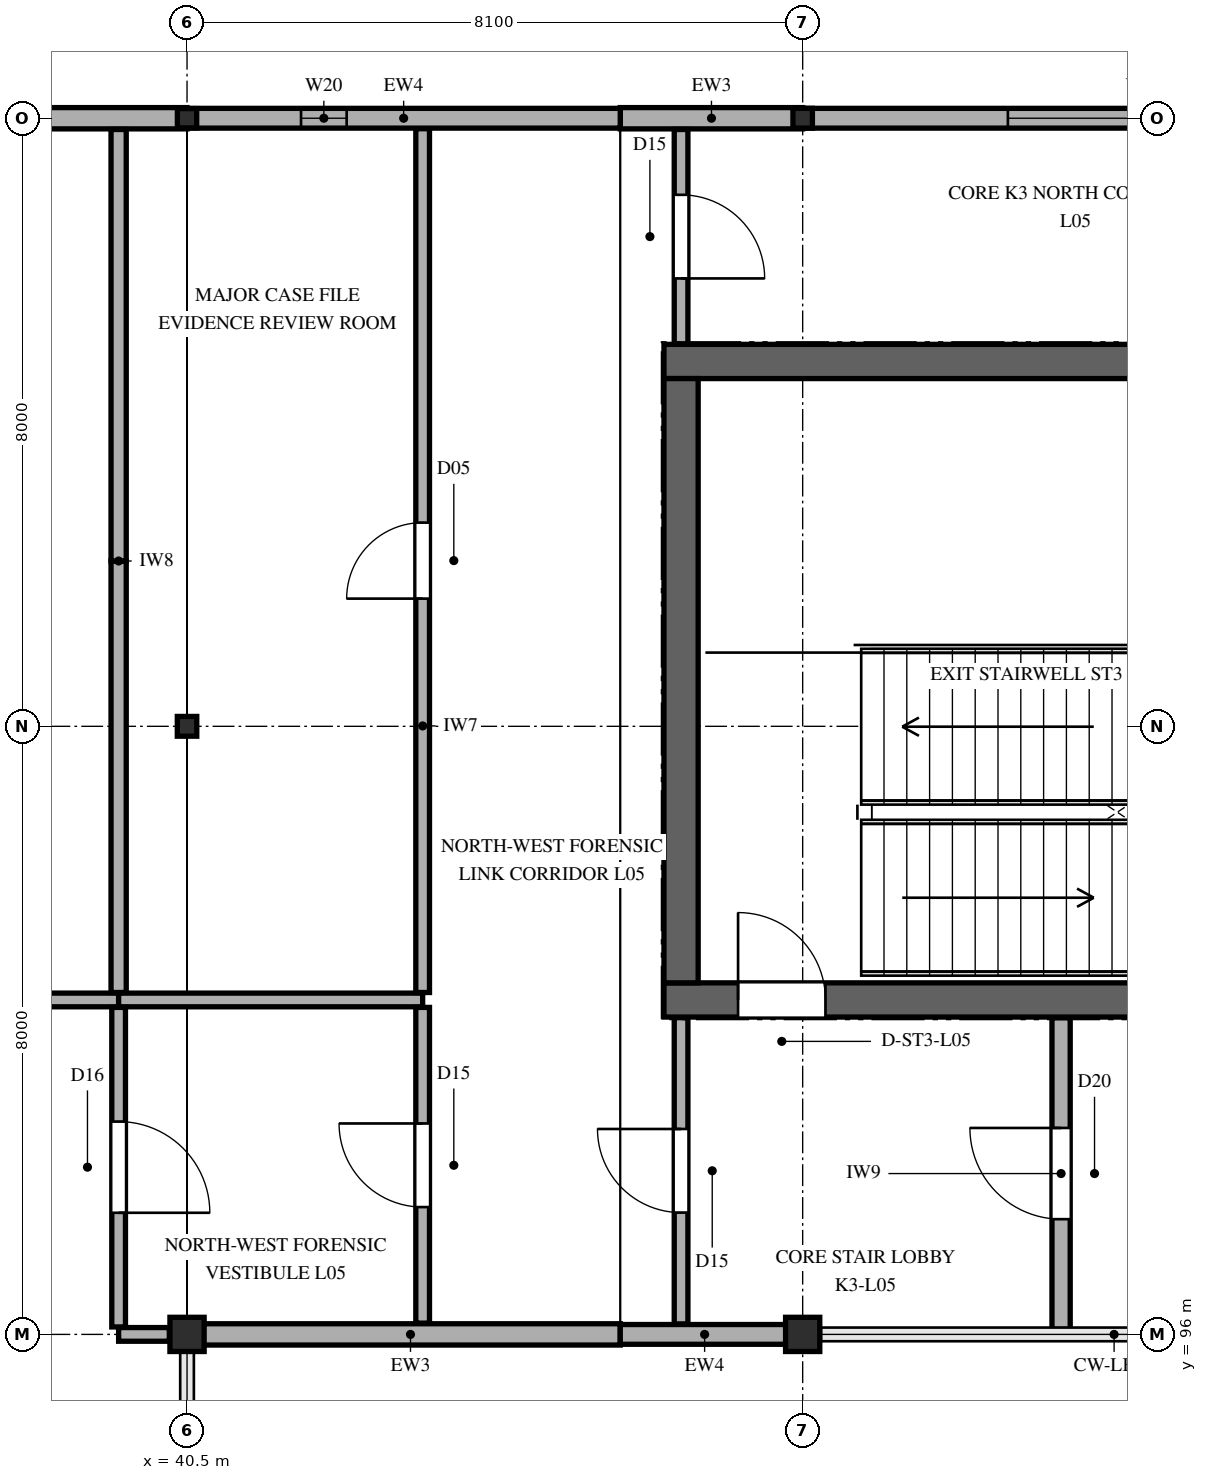
"""IFC4 building model, lengths in metres.
Left out: names, types, materials, properties, quantities, classifications, styles, units other than length and angle.
Written with IfcOpenShell. Run it as: python <this file> out.ifc"""

import sys

from ifc_helpers import new_model, si_unit, direction, frame, frame_2d, origin, origin_2d, place, context, subcontext, project, spatial, rectangle, hollow_rectangle, i_section, extrude, element, fill, save


model = new_model("IFC4")
c1 = context("Model", 3, precision=1e-05, world=origin(), true_north=direction((0.0, 1.0)))
c2 = subcontext(c1, "Body", "Model", "MODEL_VIEW")
j1 = project(units=[si_unit("LENGTHUNIT", "METRE"), si_unit("PLANEANGLEUNIT", "RADIAN")], contexts=[c1])
p1 = place(None, origin())
s1 = spatial("IfcSite", under=j1, at=p1, CompositionType="ELEMENT")
p2 = place(p1, origin())
s2 = spatial("IfcBuilding", under=s1, at=p2, CompositionType="ELEMENT")
p3 = place(p2, frame((0.0, 0.0, 24.9)))
s3 = spatial("IfcBuildingStorey", under=s2, at=p3, CompositionType="ELEMENT", Elevation=24.9)
p4 = place(p3, frame((46.775, 100.4, 0.0), z_axis=(0.0, 0.0, 1.0), x_axis=(1.0, 0.0, 0.0)))
e1 = element("IfcWall", 1, at=p4, inside=s3, PredefinedType="SHEAR", context=c2, shape_type="SweptSolid", body=[
    extrude(rectangle(XDim=15.25, YDim=0.45, at=frame_2d((7.625, 0.0))), origin(), (0.0, 0.0, 1.0), 4.2),
])
p5 = place(p4, frame((0.975, 0.0, 0.0)))
e2 = element("IfcOpeningElement", 2, at=p5, cuts=e1, PredefinedType="OPENING", context=c2, shape_type="SweptSolid", body=[
    extrude(rectangle(XDim=1.15, YDim=2.25, at=frame_2d((0.575, 1.125))), frame((0.0, 0.235, 0.0), z_axis=(0.0, -1.0, 0.0), x_axis=(1.0, 0.0, 0.0)), (0.0, 0.0, 1.0), 0.47),
])
p6 = place(p4, frame((10.258, 0.0, 0.0)))
e3 = element("IfcOpeningElement", 3, at=p6, cuts=e1, PredefinedType="OPENING", context=c2, shape_type="SweptSolid", body=[
    extrude(rectangle(XDim=1.1, YDim=2.2, at=frame_2d((0.55, 1.1))), frame((0.0, 0.235, 0.0), z_axis=(0.0, -1.0, 0.0), x_axis=(1.0, 0.0, 0.0)), (0.0, 0.0, 1.0), 0.47),
])
p7 = place(p4, frame((12.972, 0.0, 0.0)))
e4 = element("IfcOpeningElement", 4, at=p7, cuts=e1, PredefinedType="OPENING", context=c2, shape_type="SweptSolid", body=[
    extrude(rectangle(XDim=1.1, YDim=2.2, at=frame_2d((0.55, 1.1))), frame((0.0, 0.235, 0.0), z_axis=(0.0, -1.0, 0.0), x_axis=(1.0, 0.0, 0.0)), (0.0, 0.0, 1.0), 0.47),
])
p8 = place(p3, frame((46.775, 108.8, 0.0), z_axis=(0.0, 0.0, 1.0), x_axis=(1.0, 0.0, 0.0)))
e5 = element("IfcWall", 5, at=p8, inside=s3, PredefinedType="SHEAR", context=c2, shape_type="SweptSolid", body=[
    extrude(rectangle(XDim=15.25, YDim=0.45, at=frame_2d((7.625, 0.0))), origin(), (0.0, 0.0, 1.0), 4.2),
])
p9 = place(p3, frame((47.0, 100.625, 0.0), z_axis=(0.0, 0.0, 1.0), x_axis=(0.0, 1.0, 0.0)))
e6 = element("IfcWall", 6, at=p9, inside=s3, PredefinedType="SHEAR", context=c2, shape_type="SweptSolid", body=[
    extrude(rectangle(XDim=7.95, YDim=0.45, at=frame_2d((3.975, 0.0))), origin(), (0.0, 0.0, 1.0), 4.2),
])
p10 = place(p3, frame((40.5, 96.0, 0.0), z_axis=(0.0, 0.0, 1.0), x_axis=(1.0, 0.0, 0.0)))
e7 = element("IfcColumn", 7, at=p10, inside=s3, PredefinedType="COLUMN", context=c2, shape_type="SweptSolid", body=[
    extrude(rectangle(XDim=0.45, YDim=0.45, at=origin_2d()), origin(), (0.0, 0.0, 1.0), 4.2),
])
p11 = place(p3, frame((40.5, 104.0, 0.0), z_axis=(0.0, 0.0, 1.0), x_axis=(1.0, 0.0, 0.0)))
e8 = element("IfcColumn", 8, at=p11, inside=s3, PredefinedType="COLUMN", context=c2, shape_type="SweptSolid", body=[
    extrude(i_section(OverallWidth=0.256, OverallDepth=0.26, WebThickness=0.011, FlangeThickness=0.017, FilletRadius=0.013, at=origin_2d()), origin(), (0.0, 0.0, 1.0), 4.2),
])
p12 = place(p3, frame((40.5, 112.0, 0.0), z_axis=(0.0, 0.0, 1.0), x_axis=(1.0, 0.0, 0.0)))
e9 = element("IfcColumn", 9, at=p12, inside=s3, PredefinedType="COLUMN", context=c2, shape_type="SweptSolid", body=[
    extrude(hollow_rectangle(XDim=0.254, YDim=0.254, WallThickness=0.013, InnerFilletRadius=0.013, OuterFilletRadius=0.025, at=origin_2d()), origin(), (0.0, 0.0, 1.0), 4.2),
])
p13 = place(p3, frame((48.6, 96.0, 0.0), z_axis=(0.0, 0.0, 1.0), x_axis=(1.0, 0.0, 0.0)))
e10 = element("IfcColumn", 10, at=p13, inside=s3, PredefinedType="COLUMN", context=c2, shape_type="SweptSolid", body=[
    extrude(rectangle(XDim=0.45, YDim=0.45, at=origin_2d()), origin(), (0.0, 0.0, 1.0), 4.2),
])
p14 = place(p3, frame((48.6, 112.0, 0.0), z_axis=(0.0, 0.0, 1.0), x_axis=(1.0, 0.0, 0.0)))
e11 = element("IfcColumn", 11, at=p14, inside=s3, PredefinedType="COLUMN", context=c2, shape_type="SweptSolid", body=[
    extrude(i_section(OverallWidth=0.256, OverallDepth=0.26, WebThickness=0.011, FlangeThickness=0.017, FilletRadius=0.013, at=origin_2d()), origin(), (0.0, 0.0, 1.0), 4.2),
])
p15 = place(p3, frame((40.68, 96.0, 0.0), z_axis=(0.0, 0.0, 1.0), x_axis=(1.0, 0.0, 0.0)))
e12 = element("IfcWall", 12, at=p15, inside=s3, PredefinedType="SOLIDWALL", context=c2, shape_type="SweptSolid", body=[
    extrude(rectangle(XDim=5.52, YDim=0.28, at=frame_2d((2.76, 0.0))), origin(), (0.0, 0.0, 1.0), 3.402),
])
p16 = place(p3, frame((46.2, 96.0, 0.0), z_axis=(0.0, 0.0, 1.0), x_axis=(1.0, 0.0, 0.0)))
e13 = element("IfcWall", 13, at=p16, inside=s3, PredefinedType="SOLIDWALL", context=c2, shape_type="SweptSolid", body=[
    extrude(rectangle(XDim=2.22, YDim=0.26, at=frame_2d((1.11, 0.0))), origin(), (0.0, 0.0, 1.0), 3.402),
])
p17 = place(p3, frame((62.1, 112.0, 0.0), z_axis=(0.0, 0.0, 1.0), x_axis=(-1.0, 0.0, 0.0)))
e14 = element("IfcWall", 14, at=p17, inside=s3, PredefinedType="SOLIDWALL", context=c2, shape_type="SweptSolid", body=[
    extrude(rectangle(XDim=13.5, YDim=0.26, at=frame_2d((6.75, 0.0))), origin(), (0.0, 0.0, 1.0), 3.402),
])
p18 = place(p17, frame((7.2, 0.0, 0.95)))
e15 = element("IfcOpeningElement", 15, at=p18, cuts=e14, PredefinedType="OPENING", context=c2, shape_type="SweptSolid", body=[
    extrude(rectangle(XDim=3.6, YDim=1.8, at=frame_2d((1.8, 0.9))), frame((0.0, 0.14, 0.0), z_axis=(0.0, -1.0, 0.0), x_axis=(1.0, 0.0, 0.0)), (0.0, 0.0, 1.0), 0.28),
])
p19 = place(p3, frame((48.6, 112.0, 0.0), z_axis=(0.0, 0.0, 1.0), x_axis=(-1.0, 0.0, 0.0)))
e16 = element("IfcWall", 16, at=p19, inside=s3, PredefinedType="SOLIDWALL", context=c2, shape_type="SweptSolid", body=[
    extrude(rectangle(XDim=2.4, YDim=0.28, at=frame_2d((1.2, 0.0))), origin(), (0.0, 0.0, 1.0), 3.489),
])
p20 = place(p3, frame((46.2, 112.0, 0.0), z_axis=(0.0, 0.0, 1.0), x_axis=(-1.0, 0.0, 0.0)))
e17 = element("IfcWall", 17, at=p20, inside=s3, PredefinedType="SOLIDWALL", context=c2, shape_type="SweptSolid", body=[
    extrude(rectangle(XDim=5.7, YDim=0.26, at=frame_2d((2.85, 0.0))), origin(), (0.0, 0.0, 1.0), 3.489),
])
p21 = place(p20, frame((3.6, 0.0, 0.95)))
e18 = element("IfcOpeningElement", 18, at=p21, cuts=e17, PredefinedType="OPENING", context=c2, shape_type="SweptSolid", body=[
    extrude(rectangle(XDim=0.6, YDim=1.8, at=frame_2d((0.3, 0.9))), frame((0.0, 0.14, 0.0), z_axis=(0.0, -1.0, 0.0), x_axis=(1.0, 0.0, 0.0)), (0.0, 0.0, 1.0), 0.28),
])
p22 = place(p3, frame((40.5, 112.0, 0.0), z_axis=(0.0, 0.0, 1.0), x_axis=(-1.0, 0.0, 0.0)))
e19 = element("IfcWall", 19, at=p22, inside=s3, PredefinedType="SOLIDWALL", context=c2, shape_type="SweptSolid", body=[
    extrude(rectangle(XDim=12.15, YDim=0.28, at=frame_2d((6.075, 0.0))), origin(), (0.0, 0.0, 1.0), 3.402),
])
p23 = place(p22, frame((5.85, 0.0, 0.85)))
e20 = element("IfcOpeningElement", 20, at=p23, cuts=e19, PredefinedType="OPENING", context=c2, shape_type="SweptSolid", body=[
    extrude(rectangle(XDim=0.75, YDim=2.2, at=frame_2d((0.375, 1.1))), frame((0.0, 0.15, 0.0), z_axis=(0.0, -1.0, 0.0), x_axis=(1.0, 0.0, 0.0)), (0.0, 0.0, 1.0), 0.3),
])
p24 = place(p3, frame((36.2, 100.4, 0.0), z_axis=(0.0, 0.0, 1.0), x_axis=(1.0, 0.0, 0.0)))
e21 = element("IfcWall", 21, at=p24, inside=s3, PredefinedType="PARTITIONING", context=c2, shape_type="SweptSolid", body=[
    extrude(rectangle(XDim=3.4, YDim=0.18, at=frame_2d((1.7, 0.0))), origin(), (0.0, 0.0, 1.0), 3.96),
])
p25 = place(p3, frame((39.6, 96.0, 0.0), z_axis=(0.0, 0.0, 1.0), x_axis=(1.0, 0.0, 0.0)))
e22 = element("IfcWall", 22, at=p25, inside=s3, PredefinedType="PARTITIONING", context=c2, shape_type="SweptSolid", body=[
    extrude(rectangle(XDim=0.667, YDim=0.18, at=frame_2d((0.333, 0.0))), origin(), (0.0, 0.0, 1.0), 3.489),
])
p26 = place(p3, frame((39.6, 100.4, 0.0), z_axis=(0.0, 0.0, 1.0), x_axis=(1.0, 0.0, 0.0)))
e23 = element("IfcWall", 23, at=p26, inside=s3, PredefinedType="PARTITIONING", context=c2, shape_type="SweptSolid", body=[
    extrude(rectangle(XDim=4.0, YDim=0.18, at=frame_2d((2.0, 0.0))), origin(), (0.0, 0.0, 1.0), 3.96),
])
p27 = place(p3, frame((39.6, 96.098, 0.0), z_axis=(0.0, 0.0, 1.0), x_axis=(0.0, 1.0, 0.0)))
e24 = element("IfcWall", 24, at=p27, inside=s3, PredefinedType="PARTITIONING", context=c2, shape_type="SweptSolid", body=[
    extrude(rectangle(XDim=4.204, YDim=0.18, at=frame_2d((2.102, 0.0))), origin(), (0.0, 0.0, 1.0), 3.96),
])
p28 = place(p27, frame((1.502, 0.0, 0.0)))
e25 = element("IfcOpeningElement", 25, at=p28, cuts=e24, PredefinedType="OPENING", context=c2, shape_type="SweptSolid", body=[
    extrude(rectangle(XDim=1.2, YDim=2.2, at=frame_2d((0.6, 1.1))), frame((0.0, 0.1, 0.0), z_axis=(0.0, -1.0, 0.0), x_axis=(1.0, 0.0, 0.0)), (0.0, 0.0, 1.0), 0.2),
])
for number, where, z_axis, x_axis in (
    (26, (39.6, 100.498, 0.0), (0.0, 0.0, 1.0), (0.0, 1.0, 0.0)),
    (27, (39.6, 106.175, 0.0), (0.0, 0.0, 1.0), (0.0, 1.0, 0.0)),
):
    element("IfcWall", number, at=place(p3, frame(where, z_axis=z_axis, x_axis=x_axis)), inside=s3, PredefinedType="PARTITIONING", context=c2, shape_type="SweptSolid", body=[
        extrude(rectangle(XDim=5.677, YDim=0.2, at=frame_2d((2.838, 0.0))), origin(), (0.0, 0.0, 1.0), 3.96),
    ])
p29 = place(p3, frame((43.6, 96.148, 0.0), z_axis=(0.0, 0.0, 1.0), x_axis=(0.0, 1.0, 0.0)))
e28 = element("IfcWall", 28, at=p29, inside=s3, PredefinedType="PARTITIONING", context=c2, shape_type="SweptSolid", body=[
    extrude(rectangle(XDim=4.154, YDim=0.18, at=frame_2d((2.077, 0.0))), origin(), (0.0, 0.0, 1.0), 3.96),
])
p30 = place(p29, frame((1.527, 0.0, 0.0)))
e29 = element("IfcOpeningElement", 29, at=p30, cuts=e28, PredefinedType="OPENING", context=c2, shape_type="SweptSolid", body=[
    extrude(rectangle(XDim=1.1, YDim=2.2, at=frame_2d((0.55, 1.1))), frame((0.0, 0.1, 0.0), z_axis=(0.0, -1.0, 0.0), x_axis=(1.0, 0.0, 0.0)), (0.0, 0.0, 1.0), 0.2),
])
p31 = place(p3, frame((43.6, 100.498, 0.0), z_axis=(0.0, 0.0, 1.0), x_axis=(0.0, 1.0, 0.0)))
e30 = element("IfcWall", 30, at=p31, inside=s3, PredefinedType="PARTITIONING", context=c2, shape_type="SweptSolid", body=[
    extrude(rectangle(XDim=11.364, YDim=0.18, at=frame_2d((5.682, 0.0))), origin(), (0.0, 0.0, 1.0), 3.96),
])
p32 = place(p31, frame((5.182, 0.0, 0.0)))
e31 = element("IfcOpeningElement", 31, at=p32, cuts=e30, PredefinedType="OPENING", context=c2, shape_type="SweptSolid", body=[
    extrude(rectangle(XDim=1.0, YDim=2.2, at=frame_2d((0.5, 1.1))), frame((0.0, 0.1, 0.0), z_axis=(0.0, -1.0, 0.0), x_axis=(1.0, 0.0, 0.0)), (0.0, 0.0, 1.0), 0.2),
])
p33 = place(p3, frame((47.0, 96.138, 0.0), z_axis=(0.0, 0.0, 1.0), x_axis=(0.0, 1.0, 0.0)))
e32 = element("IfcWall", 32, at=p33, inside=s3, PredefinedType="PARTITIONING", context=c2, shape_type="SweptSolid", body=[
    extrude(rectangle(XDim=4.029, YDim=0.18, at=frame_2d((2.015, 0.0))), origin(), (0.0, 0.0, 1.0), 3.96),
])
p34 = place(p33, frame((1.465, 0.0, 0.0)))
e33 = element("IfcOpeningElement", 33, at=p34, cuts=e32, PredefinedType="OPENING", context=c2, shape_type="SweptSolid", body=[
    extrude(rectangle(XDim=1.1, YDim=2.2, at=frame_2d((0.55, 1.1))), frame((0.0, 0.1, 0.0), z_axis=(0.0, -1.0, 0.0), x_axis=(1.0, 0.0, 0.0)), (0.0, 0.0, 1.0), 0.2),
])
p35 = place(p3, frame((47.0, 109.033, 0.0), z_axis=(0.0, 0.0, 1.0), x_axis=(0.0, 1.0, 0.0)))
e34 = element("IfcWall", 34, at=p35, inside=s3, PredefinedType="PARTITIONING", context=c2, shape_type="SweptSolid", body=[
    extrude(rectangle(XDim=2.819, YDim=0.18, at=frame_2d((1.41, 0.0))), origin(), (0.0, 0.0, 1.0), 3.96),
])
p36 = place(p35, frame((0.86, 0.0, 0.0)))
e35 = element("IfcOpeningElement", 35, at=p36, cuts=e34, PredefinedType="OPENING", context=c2, shape_type="SweptSolid", body=[
    extrude(rectangle(XDim=1.1, YDim=2.2, at=frame_2d((0.55, 1.1))), frame((0.0, 0.1, 0.0), z_axis=(0.0, -1.0, 0.0), x_axis=(1.0, 0.0, 0.0)), (0.0, 0.0, 1.0), 0.2),
])
p37 = place(p3, frame((52.0, 96.065, 0.0), z_axis=(0.0, 0.0, 1.0), x_axis=(0.0, 1.0, 0.0)))
e36 = element("IfcWall", 36, at=p37, inside=s3, PredefinedType="PARTITIONING", context=c2, shape_type="SweptSolid", body=[
    extrude(rectangle(XDim=4.102, YDim=0.24, at=frame_2d((2.051, 0.0))), origin(), (0.0, 0.0, 1.0), 3.96),
])
p38 = place(p37, frame((1.451, 0.0, 0.0)))
e37 = element("IfcOpeningElement", 37, at=p38, cuts=e36, PredefinedType="OPENING", context=c2, shape_type="SweptSolid", body=[
    extrude(rectangle(XDim=1.2, YDim=2.3, at=frame_2d((0.6, 1.15))), frame((0.0, 0.13, 0.0), z_axis=(0.0, -1.0, 0.0), x_axis=(1.0, 0.0, 0.0)), (0.0, 0.0, 1.0), 0.26),
])
p39 = place(p18, origin())
e38 = element("IfcWindow", 38, at=p39, inside=s3, PartitioningType="TRIPLE_PANEL_VERTICAL", PredefinedType="WINDOW", context=c2, shape_type="SweptSolid", body=[
    extrude(rectangle(XDim=3.6, YDim=1.8, at=frame_2d((1.8, 0.9))), frame((0.0, 0.03, 0.0), z_axis=(0.0, -1.0, 0.0), x_axis=(1.0, 0.0, 0.0)), (0.0, 0.0, 1.0), 0.06),
])
fill(e15, e38)
p40 = place(p21, origin())
e39 = element("IfcWindow", 39, at=p40, inside=s3, PartitioningType="SINGLE_PANEL", PredefinedType="WINDOW", context=c2, shape_type="SweptSolid", body=[
    extrude(rectangle(XDim=0.6, YDim=1.8, at=frame_2d((0.3, 0.9))), frame((0.0, 0.03, 0.0), z_axis=(0.0, -1.0, 0.0), x_axis=(1.0, 0.0, 0.0)), (0.0, 0.0, 1.0), 0.06),
])
fill(e18, e39)
p41 = place(p5, origin())
e40 = element("IfcDoor", 40, at=p41, inside=s3, OperationType="SINGLE_SWING_LEFT", PredefinedType="DOOR", context=c2, shape_type="SweptSolid", body=[
    extrude(rectangle(XDim=1.15, YDim=2.25, at=frame_2d((0.575, 1.125))), frame((0.0, 0.025, 0.0), z_axis=(0.0, -1.0, 0.0), x_axis=(1.0, 0.0, 0.0)), (0.0, 0.0, 1.0), 0.05),
])
fill(e2, e40)
p42 = place(p28, frame((1.2, 0.0, 0.0), z_axis=(0.0, 0.0, 1.0), x_axis=(-1.0, 0.0, 0.0)))
e41 = element("IfcDoor", 41, at=p42, inside=s3, OperationType="SINGLE_SWING_LEFT", PredefinedType="DOOR", context=c2, shape_type="SweptSolid", body=[
    extrude(rectangle(XDim=1.2, YDim=2.2, at=frame_2d((0.6, 1.1))), frame((0.0, 0.025, 0.0), z_axis=(0.0, -1.0, 0.0), x_axis=(1.0, 0.0, 0.0)), (0.0, 0.0, 1.0), 0.05),
])
fill(e25, e41)
p43 = place(p30, origin())
e42 = element("IfcDoor", 42, at=p43, inside=s3, OperationType="SINGLE_SWING_RIGHT", PredefinedType="DOOR", context=c2, shape_type="SweptSolid", body=[
    extrude(rectangle(XDim=1.1, YDim=2.2, at=frame_2d((0.55, 1.1))), frame((0.0, 0.025, 0.0), z_axis=(0.0, -1.0, 0.0), x_axis=(1.0, 0.0, 0.0)), (0.0, 0.0, 1.0), 0.05),
])
fill(e29, e42)
p44 = place(p32, origin())
e43 = element("IfcDoor", 43, at=p44, inside=s3, OperationType="SINGLE_SWING_LEFT", PredefinedType="DOOR", context=c2, shape_type="SweptSolid", body=[
    extrude(rectangle(XDim=1.0, YDim=2.2, at=frame_2d((0.5, 1.1))), frame((0.0, 0.025, 0.0), z_axis=(0.0, -1.0, 0.0), x_axis=(1.0, 0.0, 0.0)), (0.0, 0.0, 1.0), 0.05),
])
fill(e31, e43)
p45 = place(p34, origin())
e44 = element("IfcDoor", 44, at=p45, inside=s3, OperationType="SINGLE_SWING_RIGHT", PredefinedType="DOOR", context=c2, shape_type="SweptSolid", body=[
    extrude(rectangle(XDim=1.1, YDim=2.2, at=frame_2d((0.55, 1.1))), frame((0.0, 0.025, 0.0), z_axis=(0.0, -1.0, 0.0), x_axis=(1.0, 0.0, 0.0)), (0.0, 0.0, 1.0), 0.05),
])
fill(e33, e44)
p46 = place(p36, frame((1.1, 0.0, 0.0), z_axis=(0.0, 0.0, 1.0), x_axis=(-1.0, 0.0, 0.0)))
e45 = element("IfcDoor", 45, at=p46, inside=s3, OperationType="SINGLE_SWING_LEFT", PredefinedType="DOOR", context=c2, shape_type="SweptSolid", body=[
    extrude(rectangle(XDim=1.1, YDim=2.2, at=frame_2d((0.55, 1.1))), frame((0.0, 0.025, 0.0), z_axis=(0.0, -1.0, 0.0), x_axis=(1.0, 0.0, 0.0)), (0.0, 0.0, 1.0), 0.05),
])
fill(e35, e45)
p47 = place(p38, origin())
e46 = element("IfcDoor", 46, at=p47, inside=s3, OperationType="SINGLE_SWING_RIGHT", PredefinedType="DOOR", context=c2, shape_type="SweptSolid", body=[
    extrude(rectangle(XDim=1.2, YDim=2.3, at=frame_2d((0.6, 1.15))), frame((0.0, 0.025, 0.0), z_axis=(0.0, -1.0, 0.0), x_axis=(1.0, 0.0, 0.0)), (0.0, 0.0, 1.0), 0.05),
])
fill(e37, e46)
save(model, sys.argv[1])
